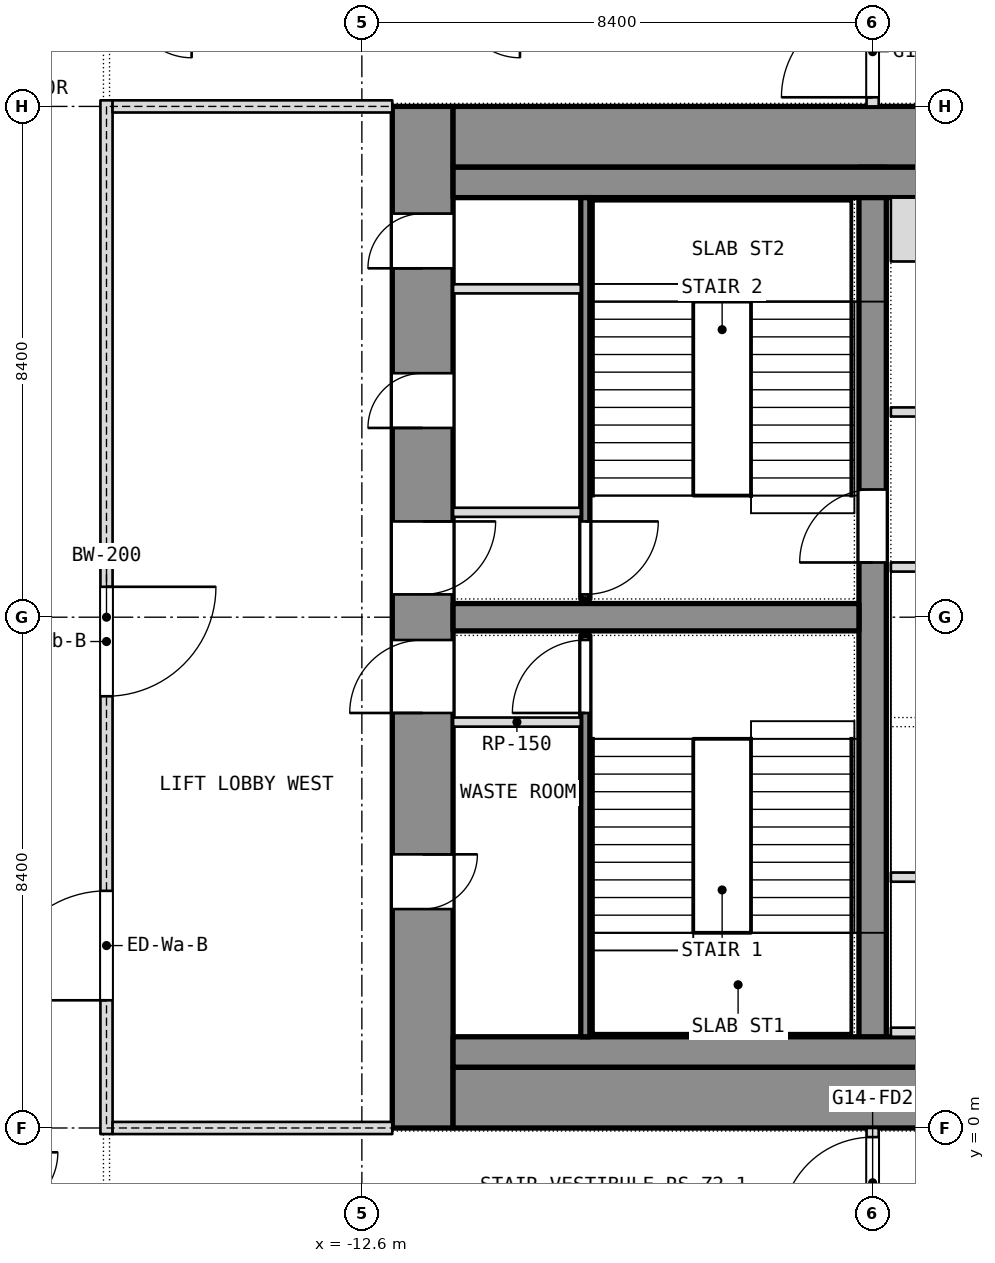
"""IFC4 building model, lengths in metres.
Left out: names, types, materials, properties, quantities, classifications, styles, units other than length and angle.
Written with IfcOpenShell. Run it as: python <this file> out.ifc"""

import sys

from ifc_helpers import new_model, si_unit, direction, frame, frame_2d, origin, place, context, subcontext, project, spatial, rectangle, extrude, element, fill, save


model = new_model("IFC4")
c1 = context("Model", 3, precision=1e-05, world=origin(), true_north=direction((0.0, 1.0)))
c2 = subcontext(c1, "Body", "Model", "MODEL_VIEW")
j1 = project(units=[si_unit("LENGTHUNIT", "METRE"), si_unit("PLANEANGLEUNIT", "RADIAN")], contexts=[c1])
p1 = place(None, origin())
s1 = spatial("IfcSite", under=j1, at=p1, CompositionType="ELEMENT")
p2 = place(p1, origin())
s2 = spatial("IfcBuilding", under=s1, at=p2, CompositionType="ELEMENT")
p3 = place(p2, frame((0.0, 0.0, 162.5)))
s3 = spatial("IfcBuildingStorey", under=s2, at=p3, CompositionType="ELEMENT", Elevation=162.5)
p4 = place(p3, frame((-11.6, 0.0, 0.0), z_axis=(0.0, 0.0, 1.0), x_axis=(0.0, 1.0, 0.0)))
e1 = element("IfcWall", 1, at=p4, inside=s3, PredefinedType="SHEAR", context=c2, shape_type="SweptSolid", body=[
    extrude(rectangle(XDim=16.8, YDim=1.0, at=frame_2d((8.4, 0.0))), origin(), (0.0, 0.0, 1.0), 3.6),
])
p5 = place(p4, frame((3.6, 0.0, 0.0)))
e2 = element("IfcOpeningElement", 2, at=p5, cuts=e1, PredefinedType="OPENING", context=c2, shape_type="SweptSolid", body=[
    extrude(rectangle(XDim=0.9, YDim=2.1, at=frame_2d((0.45, 1.05))), frame((0.0, 0.5, 0.0), z_axis=(0.0, -1.0, 0.0), x_axis=(1.0, 0.0, 0.0)), (0.0, 0.0, 1.0), 1.0),
])
p6 = place(p4, frame((6.825, 0.0, 0.0)))
e3 = element("IfcOpeningElement", 3, at=p6, cuts=e1, PredefinedType="OPENING", context=c2, shape_type="SweptSolid", body=[
    extrude(rectangle(XDim=1.2, YDim=2.1, at=frame_2d((0.6, 1.05))), frame((0.0, 0.5, 0.0), z_axis=(0.0, -1.0, 0.0), x_axis=(1.0, 0.0, 0.0)), (0.0, 0.0, 1.0), 1.0),
])
p7 = place(p4, frame((14.137, 0.0, 0.0)))
e4 = element("IfcOpeningElement", 4, at=p7, cuts=e1, PredefinedType="OPENING", context=c2, shape_type="SweptSolid", body=[
    extrude(rectangle(XDim=0.9, YDim=2.1, at=frame_2d((0.45, 1.05))), frame((0.0, 0.5, 0.0), z_axis=(0.0, -1.0, 0.0), x_axis=(1.0, 0.0, 0.0)), (0.0, 0.0, 1.0), 1.0),
])
p8 = place(p4, frame((11.512, 0.0, 0.0)))
e5 = element("IfcOpeningElement", 5, at=p8, cuts=e1, PredefinedType="OPENING", context=c2, shape_type="SweptSolid", body=[
    extrude(rectangle(XDim=0.9, YDim=2.1, at=frame_2d((0.45, 1.05))), frame((0.0, 0.5, 0.0), z_axis=(0.0, -1.0, 0.0), x_axis=(1.0, 0.0, 0.0)), (0.0, 0.0, 1.0), 1.0),
])
p9 = place(p4, frame((8.775, 0.0, 0.0)))
e6 = element("IfcOpeningElement", 6, at=p9, cuts=e1, PredefinedType="OPENING", context=c2, shape_type="SweptSolid", body=[
    extrude(rectangle(XDim=1.2, YDim=2.1, at=frame_2d((0.6, 1.05))), frame((0.0, 0.5, 0.0), z_axis=(0.0, -1.0, 0.0), x_axis=(1.0, 0.0, 0.0)), (0.0, 0.0, 1.0), 1.0),
])
for number, where, z_axis, x_axis in (
    (7, (-11.1, 0.5, 0.0), (0.0, 0.0, 1.0), (1.0, 0.0, 0.0)),
    (8, (-11.1, 16.3, 0.0), (0.0, 0.0, 1.0), (1.0, 0.0, 0.0)),
):
    element("IfcWall", number, at=place(p3, frame(where, z_axis=z_axis, x_axis=x_axis)), inside=s3, PredefinedType="SHEAR", context=c2, shape_type="SweptSolid", body=[
        extrude(rectangle(XDim=22.2, YDim=1.0, at=frame_2d((11.1, 0.0))), origin(), (0.0, 0.0, 1.0), 3.6),
    ])
p10 = place(p3, frame((-4.2, 1.0, 0.0), z_axis=(0.0, 0.0, 1.0), x_axis=(0.0, 1.0, 0.0)))
e9 = element("IfcWall", 9, at=p10, inside=s3, PredefinedType="SHEAR", context=c2, shape_type="SweptSolid", body=[
    extrude(rectangle(XDim=14.8, YDim=0.45, at=frame_2d((7.4, 0.0))), origin(), (0.0, 0.0, 1.0), 3.6),
])
p11 = place(p10, frame((8.3, 0.0, 0.0)))
e10 = element("IfcOpeningElement", 10, at=p11, cuts=e9, PredefinedType="OPENING", context=c2, shape_type="SweptSolid", body=[
    extrude(rectangle(XDim=1.2, YDim=2.1, at=frame_2d((0.6, 1.05))), frame((0.0, 0.225, 0.0), z_axis=(0.0, -1.0, 0.0), x_axis=(1.0, 0.0, 0.0)), (0.0, 0.0, 1.0), 0.45),
])
p12 = place(p3, frame((-11.1, 8.4, 0.0), z_axis=(0.0, 0.0, 1.0), x_axis=(1.0, 0.0, 0.0)))
e11 = element("IfcWall", 11, at=p12, inside=s3, PredefinedType="SHEAR", context=c2, shape_type="SweptSolid", body=[
    extrude(rectangle(XDim=6.675, YDim=0.45, at=frame_2d((3.337, 0.0))), origin(), (0.0, 0.0, 1.0), 3.6),
])
p13 = place(p3, frame((-4.2, 16.8, 0.0), z_axis=(0.0, 0.0, 1.0), x_axis=(0.0, 1.0, 0.0)))
e12 = element("IfcWall", 12, at=p13, inside=s3, PredefinedType="PARTITIONING", context=c2, shape_type="SweptSolid", body=[
    extrude(rectangle(XDim=11.14, YDim=0.2, at=frame_2d((5.57, 0.0))), origin(), (0.0, 0.0, 1.0), 3.34),
])
p14 = place(p13, frame((0.15, 0.0, 0.0)))
e13 = element("IfcOpeningElement", 13, at=p14, cuts=e12, PredefinedType="OPENING", context=c2, shape_type="SweptSolid", body=[
    extrude(rectangle(XDim=1.5, YDim=2.1, at=frame_2d((0.75, 1.05))), frame((0.0, 0.1, 0.0), z_axis=(0.0, -1.0, 0.0), x_axis=(1.0, 0.0, 0.0)), (0.0, 0.0, 1.0), 0.2),
])
p15 = place(p3, frame((-4.2, -13.8, 0.0), z_axis=(0.0, 0.0, 1.0), x_axis=(0.0, 1.0, 0.0)))
e14 = element("IfcWall", 14, at=p15, inside=s3, PredefinedType="PARTITIONING", context=c2, shape_type="SweptSolid", body=[
    extrude(rectangle(XDim=13.8, YDim=0.2, at=frame_2d((6.9, 0.0))), origin(), (0.0, 0.0, 1.0), 3.34),
])
p16 = place(p15, frame((12.15, 0.0, 0.0)))
e15 = element("IfcOpeningElement", 15, at=p16, cuts=e14, PredefinedType="OPENING", context=c2, shape_type="SweptSolid", body=[
    extrude(rectangle(XDim=1.5, YDim=2.1, at=frame_2d((0.75, 1.05))), frame((0.0, 0.1, 0.0), z_axis=(0.0, -1.0, 0.0), x_axis=(1.0, 0.0, 0.0)), (0.0, 0.0, 1.0), 0.2),
])
p17 = place(p15, frame((0.325, 0.0, 0.0)))
e16 = element("IfcOpeningElement", 16, at=p17, cuts=e14, PredefinedType="OPENING", context=c2, shape_type="SweptSolid", body=[
    extrude(rectangle(XDim=1.5, YDim=2.1, at=frame_2d((0.75, 1.05))), frame((0.0, 0.1, 0.0), z_axis=(0.0, -1.0, 0.0), x_axis=(1.0, 0.0, 0.0)), (0.0, 0.0, 1.0), 0.2),
])
for number, where, z_axis, x_axis in (
    (17, (-11.1, 1.25, 0.0), (0.0, 0.0, 1.0), (1.0, 0.0, 0.0)),
    (18, (-11.1, 15.55, 0.0), (0.0, 0.0, 1.0), (1.0, 0.0, 0.0)),
):
    element("IfcWall", number, at=place(p3, frame(where, z_axis=z_axis, x_axis=x_axis)), inside=s3, PredefinedType="PARTITIONING", context=c2, shape_type="SweptSolid", body=[
        extrude(rectangle(XDim=22.2, YDim=0.5, at=frame_2d((11.1, 0.0))), origin(), (0.0, 0.0, 1.0), 3.34),
    ])
p18 = place(p3, frame((-8.925, 1.5, 0.0), z_axis=(0.0, 0.0, 1.0), x_axis=(0.0, 1.0, 0.0)))
e19 = element("IfcWall", 19, at=p18, inside=s3, PredefinedType="SHEAR", context=c2, shape_type="SweptSolid", body=[
    extrude(rectangle(XDim=6.6, YDim=0.15, at=frame_2d((3.3, 0.0))), origin(), (0.0, 0.0, 1.0), 3.34),
])
p19 = place(p18, frame((5.325, 0.0, 0.0)))
e20 = element("IfcOpeningElement", 20, at=p19, cuts=e19, PredefinedType="OPENING", context=c2, shape_type="SweptSolid", body=[
    extrude(rectangle(XDim=1.2, YDim=2.1, at=frame_2d((0.6, 1.05))), frame((0.0, 0.075, 0.0), z_axis=(0.0, -1.0, 0.0), x_axis=(1.0, 0.0, 0.0)), (0.0, 0.0, 1.0), 0.15),
])
p20 = place(p3, frame((-11.1, 6.675, 0.0), z_axis=(0.0, 0.0, 1.0), x_axis=(1.0, 0.0, 0.0)))
e21 = element("IfcWall", 21, at=p20, inside=s3, PredefinedType="PARTITIONING", context=c2, shape_type="SweptSolid", body=[
    extrude(rectangle(XDim=2.1, YDim=0.15, at=frame_2d((1.05, 0.0))), origin(), (0.0, 0.0, 1.0), 3.34),
])
p21 = place(p3, frame((-8.925, 8.7, 0.0), z_axis=(0.0, 0.0, 1.0), x_axis=(0.0, 1.0, 0.0)))
e22 = element("IfcWall", 22, at=p21, inside=s3, PredefinedType="SHEAR", context=c2, shape_type="SweptSolid", body=[
    extrude(rectangle(XDim=6.6, YDim=0.15, at=frame_2d((3.3, 0.0))), origin(), (0.0, 0.0, 1.0), 3.34),
])
p22 = place(p21, frame((0.075, 0.0, 0.0)))
e23 = element("IfcOpeningElement", 23, at=p22, cuts=e22, PredefinedType="OPENING", context=c2, shape_type="SweptSolid", body=[
    extrude(rectangle(XDim=1.2, YDim=2.1, at=frame_2d((0.6, 1.05))), frame((0.0, 0.075, 0.0), z_axis=(0.0, -1.0, 0.0), x_axis=(1.0, 0.0, 0.0)), (0.0, 0.0, 1.0), 0.15),
])
for number, where, z_axis, x_axis in (
    (24, (-11.1, 10.125, 0.0), (0.0, 0.0, 1.0), (1.0, 0.0, 0.0)),
    (25, (-11.1, 13.8, 0.0), (0.0, 0.0, 1.0), (1.0, 0.0, 0.0)),
):
    element("IfcWall", number, at=place(p3, frame(where, z_axis=z_axis, x_axis=x_axis)), inside=s3, PredefinedType="PARTITIONING", context=c2, shape_type="SweptSolid", body=[
        extrude(rectangle(XDim=2.1, YDim=0.15, at=frame_2d((1.05, 0.0))), origin(), (0.0, 0.0, 1.0), 3.34),
    ])
p23 = place(p3, frame((-3.9, 4.125, 0.0), z_axis=(0.0, 0.0, 1.0), x_axis=(1.0, 0.0, 0.0)))
e26 = element("IfcWall", 26, at=p23, inside=s3, PredefinedType="PARTITIONING", context=c2, shape_type="SweptSolid", body=[
    extrude(rectangle(XDim=7.8, YDim=0.15, at=frame_2d((3.9, 0.0))), origin(), (0.0, 0.0, 1.0), 3.34),
])
p24 = place(p23, frame((3.75, 0.0, 0.0)))
e27 = element("IfcOpeningElement", 27, at=p24, cuts=e26, PredefinedType="OPENING", context=c2, shape_type="SweptSolid", body=[
    extrude(rectangle(XDim=1.2, YDim=2.1, at=frame_2d((0.6, 1.05))), frame((0.0, 0.075, 0.0), z_axis=(0.0, -1.0, 0.0), x_axis=(1.0, 0.0, 0.0)), (0.0, 0.0, 1.0), 0.15),
])
p25 = place(p3, frame((-3.9, 11.775, 0.0), z_axis=(0.0, 0.0, 1.0), x_axis=(1.0, 0.0, 0.0)))
e28 = element("IfcWall", 28, at=p25, inside=s3, PredefinedType="PARTITIONING", context=c2, shape_type="SweptSolid", body=[
    extrude(rectangle(XDim=7.8, YDim=0.15, at=frame_2d((3.9, 0.0))), origin(), (0.0, 0.0, 1.0), 3.34),
])
p26 = place(p25, frame((3.3, 0.0, 0.0)))
e29 = element("IfcOpeningElement", 29, at=p26, cuts=e28, PredefinedType="OPENING", context=c2, shape_type="SweptSolid", body=[
    extrude(rectangle(XDim=1.2, YDim=2.1, at=frame_2d((0.6, 1.05))), frame((0.0, 0.075, 0.0), z_axis=(0.0, -1.0, 0.0), x_axis=(1.0, 0.0, 0.0)), (0.0, 0.0, 1.0), 0.15),
])
p27 = place(p3, frame((-3.9, 1.575, 0.0), z_axis=(0.0, 0.0, 1.0), x_axis=(1.0, 0.0, 0.0)))
e30 = element("IfcWall", 30, at=p27, inside=s3, PredefinedType="SHEAR", context=c2, shape_type="SweptSolid", body=[
    extrude(rectangle(XDim=3.0, YDim=0.15, at=frame_2d((1.5, 0.0))), origin(), (0.0, 0.0, 1.0), 3.6),
])
p28 = place(p3, frame((-3.9, 9.225, 0.0), z_axis=(0.0, 0.0, 1.0), x_axis=(1.0, 0.0, 0.0)))
e31 = element("IfcWall", 31, at=p28, inside=s3, PredefinedType="SHEAR", context=c2, shape_type="SweptSolid", body=[
    extrude(rectangle(XDim=2.25, YDim=0.15, at=frame_2d((1.125, 0.0))), origin(), (0.0, 0.0, 1.0), 3.6),
])
p29 = place(p3, frame((-3.9, 14.775, 0.0), z_axis=(0.0, 0.0, 1.0), x_axis=(1.0, 0.0, 0.0)))
e32 = element("IfcWall", 32, at=p29, inside=s3, PredefinedType="PARTITIONING", context=c2, shape_type="SweptSolid", body=[
    extrude(rectangle(XDim=2.25, YDim=1.05, at=frame_2d((1.125, 0.0))), origin(), (0.0, 0.0, 1.0), 3.34),
])
p30 = place(p3, frame((-16.8, -0.1, 0.0), z_axis=(0.0, 0.0, 1.0), x_axis=(0.0, 1.0, 0.0)))
e33 = element("IfcWall", 33, at=p30, inside=s3, PredefinedType="PARTITIONING", context=c2, shape_type="SweptSolid", body=[
    extrude(rectangle(XDim=17.0, YDim=0.2, at=frame_2d((8.5, 0.0))), origin(), (0.0, 0.0, 1.0), 3.34),
])
p31 = place(p30, frame((2.2, 0.0, 0.0)))
e34 = element("IfcOpeningElement", 34, at=p31, cuts=e33, PredefinedType="OPENING", context=c2, shape_type="SweptSolid", body=[
    extrude(rectangle(XDim=1.8, YDim=2.1, at=frame_2d((0.9, 1.05))), frame((0.0, 0.1, 0.0), z_axis=(0.0, -1.0, 0.0), x_axis=(1.0, 0.0, 0.0)), (0.0, 0.0, 1.0), 0.2),
])
p32 = place(p30, frame((7.2, 0.0, 0.0)))
e35 = element("IfcOpeningElement", 35, at=p32, cuts=e33, PredefinedType="OPENING", context=c2, shape_type="SweptSolid", body=[
    extrude(rectangle(XDim=1.8, YDim=2.1, at=frame_2d((0.9, 1.05))), frame((0.0, 0.1, 0.0), z_axis=(0.0, -1.0, 0.0), x_axis=(1.0, 0.0, 0.0)), (0.0, 0.0, 1.0), 0.2),
])
for number, where, z_axis, x_axis in (
    (36, (-16.7, 0.0, 0.0), (0.0, 0.0, 1.0), (1.0, 0.0, 0.0)),
    (37, (-16.7, 16.8, 0.0), (0.0, 0.0, 1.0), (1.0, 0.0, 0.0)),
):
    element("IfcWall", number, at=place(p3, frame(where, z_axis=z_axis, x_axis=x_axis)), inside=s3, PredefinedType="PARTITIONING", context=c2, shape_type="SweptSolid", body=[
        extrude(rectangle(XDim=4.6, YDim=0.2, at=frame_2d((2.3, 0.0))), origin(), (0.0, 0.0, 1.0), 2.89),
    ])
p33 = place(p5, origin())
e38 = element("IfcDoor", 38, at=p33, inside=s3, OperationType="SINGLE_SWING_LEFT", PredefinedType="DOOR", context=c2, shape_type="SweptSolid", body=[
    extrude(rectangle(XDim=0.9, YDim=2.1, at=frame_2d((0.45, 1.05))), frame((0.0, 0.025, 0.0), z_axis=(0.0, -1.0, 0.0), x_axis=(1.0, 0.0, 0.0)), (0.0, 0.0, 1.0), 0.05),
])
fill(e2, e38)
p34 = place(p6, origin())
e39 = element("IfcDoor", 39, at=p34, inside=s3, OperationType="SINGLE_SWING_LEFT", PredefinedType="DOOR", context=c2, shape_type="SweptSolid", body=[
    extrude(rectangle(XDim=1.2, YDim=2.1, at=frame_2d((0.6, 1.05))), frame((0.0, 0.025, 0.0), z_axis=(0.0, -1.0, 0.0), x_axis=(1.0, 0.0, 0.0)), (0.0, 0.0, 1.0), 0.05),
])
fill(e3, e39)
p35 = place(p19, origin())
e40 = element("IfcDoor", 40, at=p35, inside=s3, OperationType="SINGLE_SWING_LEFT", PredefinedType="DOOR", context=c2, shape_type="SweptSolid", body=[
    extrude(rectangle(XDim=1.2, YDim=2.1, at=frame_2d((0.6, 1.05))), frame((0.0, 0.025, 0.0), z_axis=(0.0, -1.0, 0.0), x_axis=(1.0, 0.0, 0.0)), (0.0, 0.0, 1.0), 0.05),
])
fill(e20, e40)
p36 = place(p7, origin())
e41 = element("IfcDoor", 41, at=p36, inside=s3, OperationType="SINGLE_SWING_LEFT", PredefinedType="DOOR", context=c2, shape_type="SweptSolid", body=[
    extrude(rectangle(XDim=0.9, YDim=2.1, at=frame_2d((0.45, 1.05))), frame((0.0, 0.025, 0.0), z_axis=(0.0, -1.0, 0.0), x_axis=(1.0, 0.0, 0.0)), (0.0, 0.0, 1.0), 0.05),
])
fill(e4, e41)
p37 = place(p8, origin())
e42 = element("IfcDoor", 42, at=p37, inside=s3, OperationType="SINGLE_SWING_LEFT", PredefinedType="DOOR", context=c2, shape_type="SweptSolid", body=[
    extrude(rectangle(XDim=0.9, YDim=2.1, at=frame_2d((0.45, 1.05))), frame((0.0, 0.025, 0.0), z_axis=(0.0, -1.0, 0.0), x_axis=(1.0, 0.0, 0.0)), (0.0, 0.0, 1.0), 0.05),
])
fill(e5, e42)
p38 = place(p9, origin())
e43 = element("IfcDoor", 43, at=p38, inside=s3, OperationType="SINGLE_SWING_LEFT", PredefinedType="DOOR", context=c2, shape_type="SweptSolid", body=[
    extrude(rectangle(XDim=1.2, YDim=2.1, at=frame_2d((0.6, 1.05))), frame((0.0, 0.025, 0.0), z_axis=(0.0, -1.0, 0.0), x_axis=(1.0, 0.0, 0.0)), (0.0, 0.0, 1.0), 0.05),
])
fill(e6, e43)
p39 = place(p22, origin())
e44 = element("IfcDoor", 44, at=p39, inside=s3, OperationType="SINGLE_SWING_LEFT", PredefinedType="DOOR", context=c2, shape_type="SweptSolid", body=[
    extrude(rectangle(XDim=1.2, YDim=2.1, at=frame_2d((0.6, 1.05))), frame((0.0, 0.025, 0.0), z_axis=(0.0, -1.0, 0.0), x_axis=(1.0, 0.0, 0.0)), (0.0, 0.0, 1.0), 0.05),
])
fill(e23, e44)
p40 = place(p11, origin())
e45 = element("IfcDoor", 45, at=p40, inside=s3, OperationType="SINGLE_SWING_LEFT", PredefinedType="DOOR", context=c2, shape_type="SweptSolid", body=[
    extrude(rectangle(XDim=1.2, YDim=2.1, at=frame_2d((0.6, 1.05))), frame((0.0, 0.025, 0.0), z_axis=(0.0, -1.0, 0.0), x_axis=(1.0, 0.0, 0.0)), (0.0, 0.0, 1.0), 0.05),
])
fill(e10, e45)
p41 = place(p31, origin())
e46 = element("IfcDoor", 46, at=p41, inside=s3, OperationType="DOUBLE_DOOR_SINGLE_SWING", PredefinedType="DOOR", context=c2, shape_type="SweptSolid", body=[
    extrude(rectangle(XDim=1.8, YDim=2.1, at=frame_2d((0.9, 1.05))), frame((0.0, 0.025, 0.0), z_axis=(0.0, -1.0, 0.0), x_axis=(1.0, 0.0, 0.0)), (0.0, 0.0, 1.0), 0.05),
])
fill(e34, e46)
p42 = place(p32, origin())
e47 = element("IfcDoor", 47, at=p42, inside=s3, OperationType="DOUBLE_DOOR_SINGLE_SWING", PredefinedType="DOOR", context=c2, shape_type="SweptSolid", body=[
    extrude(rectangle(XDim=1.8, YDim=2.1, at=frame_2d((0.9, 1.05))), frame((0.0, 0.025, 0.0), z_axis=(0.0, -1.0, 0.0), x_axis=(1.0, 0.0, 0.0)), (0.0, 0.0, 1.0), 0.05),
])
fill(e35, e47)
p43 = place(p14, origin())
e48 = element("IfcDoor", 48, at=p43, inside=s3, OperationType="DOUBLE_DOOR_DOUBLE_SWING", PredefinedType="DOOR", context=c2, shape_type="SweptSolid", body=[
    extrude(rectangle(XDim=1.5, YDim=2.1, at=frame_2d((0.75, 1.05))), frame((0.0, 0.025, 0.0), z_axis=(0.0, -1.0, 0.0), x_axis=(1.0, 0.0, 0.0)), (0.0, 0.0, 1.0), 0.05),
])
fill(e13, e48)
p44 = place(p16, origin())
e49 = element("IfcDoor", 49, at=p44, inside=s3, OperationType="DOUBLE_DOOR_DOUBLE_SWING", PredefinedType="DOOR", context=c2, shape_type="SweptSolid", body=[
    extrude(rectangle(XDim=1.5, YDim=2.1, at=frame_2d((0.75, 1.05))), frame((0.0, 0.025, 0.0), z_axis=(0.0, -1.0, 0.0), x_axis=(1.0, 0.0, 0.0)), (0.0, 0.0, 1.0), 0.05),
])
fill(e15, e49)
save(model, sys.argv[1])
